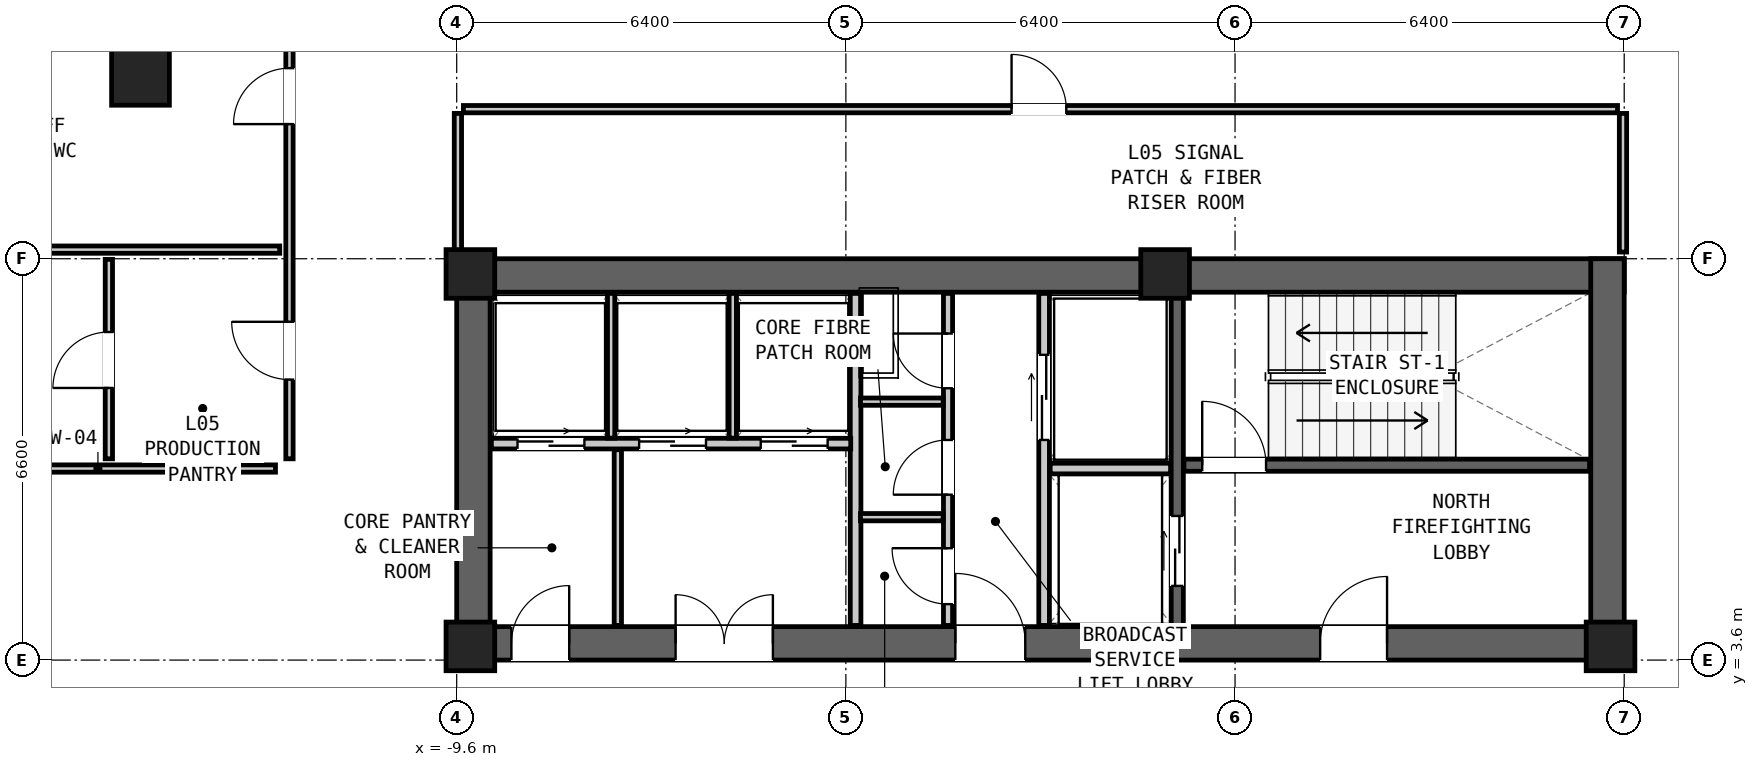
"""IFC4 building model, lengths in metres.
Left out: names, types, materials, properties, quantities, classifications, styles, units other than length and angle.
Written with IfcOpenShell. Run it as: python <this file> out.ifc"""

import sys

from ifc_helpers import new_model, si_unit, direction, frame, frame_2d, origin, origin_2d, place, context, subcontext, project, spatial, rectangle, hollow_rectangle, extrude, element, fill, save


model = new_model("IFC4")
c1 = context("Model", 3, precision=1e-05, world=origin(), true_north=direction((0.0, 1.0)))
c2 = subcontext(c1, "Body", "Model", "MODEL_VIEW")
j1 = project(units=[si_unit("LENGTHUNIT", "METRE"), si_unit("PLANEANGLEUNIT", "RADIAN")], contexts=[c1])
p1 = place(None, origin())
s1 = spatial("IfcSite", under=j1, at=p1, CompositionType="ELEMENT")
p2 = place(p1, origin())
s2 = spatial("IfcBuilding", under=s1, at=p2, CompositionType="ELEMENT")
p3 = place(p2, frame((0.0, 0.0, 21.9)))
s3 = spatial("IfcBuildingStorey", under=s2, at=p3, CompositionType="ELEMENT", Elevation=21.9)
p4 = place(p3, frame((-9.6, 9.925, 0.0), z_axis=(0.0, 0.0, 1.0), x_axis=(1.0, 0.0, 0.0)))
e1 = element("IfcWall", 1, at=p4, inside=s3, PredefinedType="SHEAR", context=c2, shape_type="SweptSolid", body=[
    extrude(rectangle(XDim=19.2, YDim=0.55, at=frame_2d((9.6, 0.0))), origin(), (0.0, 0.0, 1.0), 4.2),
])
p5 = place(p3, frame((-9.6, 3.875, 0.0), z_axis=(0.0, 0.0, 1.0), x_axis=(1.0, 0.0, 0.0)))
e2 = element("IfcWall", 2, at=p5, inside=s3, PredefinedType="SHEAR", context=c2, shape_type="SweptSolid", body=[
    extrude(rectangle(XDim=19.2, YDim=0.55, at=frame_2d((9.6, 0.0))), origin(), (0.0, 0.0, 1.0), 4.2),
])
p6 = place(p5, frame((14.2, 0.0, 0.0)))
e3 = element("IfcOpeningElement", 3, at=p6, cuts=e2, PredefinedType="OPENING", context=c2, shape_type="SweptSolid", body=[
    extrude(rectangle(XDim=1.1, YDim=2.08, at=frame_2d((0.55, 1.04))), frame((0.0, 0.287, 0.0), z_axis=(0.0, -1.0, 0.0), x_axis=(1.0, 0.0, 0.0)), (0.0, 0.0, 1.0), 0.574),
])
p7 = place(p5, frame((8.2, 0.0, 0.0)))
e4 = element("IfcOpeningElement", 4, at=p7, cuts=e2, PredefinedType="OPENING", context=c2, shape_type="SweptSolid", body=[
    extrude(rectangle(XDim=1.15, YDim=2.1, at=frame_2d((0.575, 1.05))), frame((0.0, 0.287, 0.0), z_axis=(0.0, -1.0, 0.0), x_axis=(1.0, 0.0, 0.0)), (0.0, 0.0, 1.0), 0.574),
])
p8 = place(p5, frame((0.9, 0.0, 0.0)))
e5 = element("IfcOpeningElement", 5, at=p8, cuts=e2, PredefinedType="OPENING", context=c2, shape_type="SweptSolid", body=[
    extrude(rectangle(XDim=0.95, YDim=2.1, at=frame_2d((0.475, 1.05))), frame((0.0, 0.287, 0.0), z_axis=(0.0, -1.0, 0.0), x_axis=(1.0, 0.0, 0.0)), (0.0, 0.0, 1.0), 0.574),
])
p9 = place(p5, frame((3.6, 0.0, 0.0)))
e6 = element("IfcOpeningElement", 6, at=p9, cuts=e2, PredefinedType="OPENING", context=c2, shape_type="SweptSolid", body=[
    extrude(rectangle(XDim=1.6, YDim=2.12, at=frame_2d((0.8, 1.06))), frame((0.0, 0.287, 0.0), z_axis=(0.0, -1.0, 0.0), x_axis=(1.0, 0.0, 0.0)), (0.0, 0.0, 1.0), 0.574),
])
for number, where, z_axis, x_axis in (
    (7, (-9.325, 3.6, 0.0), (0.0, 0.0, 1.0), (0.0, 1.0, 0.0)),
    (8, (9.325, 3.6, 0.0), (0.0, 0.0, 1.0), (0.0, 1.0, 0.0)),
):
    element("IfcWall", number, at=place(p3, frame(where, z_axis=z_axis, x_axis=x_axis)), inside=s3, PredefinedType="SHEAR", context=c2, shape_type="SweptSolid", body=[
        extrude(rectangle(XDim=6.6, YDim=0.55, at=frame_2d((3.3, 0.0))), origin(), (0.0, 0.0, 1.0), 4.2),
    ])
p10 = place(p3, frame((-14.8, 13.2, 0.0), z_axis=(0.0, 0.0, 1.0), x_axis=(1.0, 0.0, 0.0)))
e9 = element("IfcColumn", 9, at=p10, inside=s3, PredefinedType="COLUMN", context=c2, shape_type="SweptSolid", body=[
    extrude(hollow_rectangle(XDim=0.95, YDim=0.95, WallThickness=0.06, at=origin_2d()), origin(), (0.0, 0.0, 1.0), 4.2),
])
for number, where, z_axis, x_axis in (
    (10, (-9.375, 9.95, 0.0), (0.0, 0.0, 1.0), (1.0, 0.0, 0.0)),
    (11, (2.05, 9.95, 0.0), (0.0, 0.0, 1.0), (1.0, 0.0, 0.0)),
    (12, (-9.375, 3.825, 0.0), (0.0, 0.0, 1.0), (1.0, 0.0, 0.0)),
    (13, (9.375, 3.825, 0.0), (0.0, 0.0, 1.0), (1.0, 0.0, 0.0)),
):
    element("IfcColumn", number, at=place(p3, frame(where, z_axis=z_axis, x_axis=x_axis)), inside=s3, PredefinedType="COLUMN", context=c2, shape_type="SweptSolid", body=[
        extrude(rectangle(XDim=0.8, YDim=0.8, at=origin_2d()), origin(), (0.0, 0.0, 1.0), 4.2),
    ])
p11 = place(p3, frame((2.36, 6.805, 0.0), z_axis=(0.0, 0.0, 1.0), x_axis=(1.0, 0.0, 0.0)))
e14 = element("IfcWall", 14, at=p11, inside=s3, PredefinedType="SHEAR", context=c2, shape_type="SweptSolid", body=[
    extrude(rectangle(XDim=6.67, YDim=0.2, at=frame_2d((3.335, 0.0))), origin(), (0.0, 0.0, 1.0), 3.98),
])
p12 = place(p11, frame((0.3, 0.0, 0.0)))
e15 = element("IfcOpeningElement", 15, at=p12, cuts=e14, PredefinedType="OPENING", context=c2, shape_type="SweptSolid", body=[
    extrude(rectangle(XDim=1.05, YDim=2.08, at=frame_2d((0.525, 1.04))), frame((0.0, 0.112, 0.0), z_axis=(0.0, -1.0, 0.0), x_axis=(1.0, 0.0, 0.0)), (0.0, 0.0, 1.0), 0.224),
])
p13 = place(p3, frame((2.25, 4.17, 0.0), z_axis=(0.0, 0.0, 1.0), x_axis=(0.0, 1.0, 0.0)))
e16 = element("IfcWall", 16, at=p13, inside=s3, PredefinedType="SHEAR", context=c2, shape_type="SweptSolid", body=[
    extrude(rectangle(XDim=5.46, YDim=0.2, at=frame_2d((2.73, 0.0))), origin(), (0.0, 0.0, 1.0), 3.98),
])
p14 = place(p13, frame((0.65, 0.0, 0.0)))
e17 = element("IfcOpeningElement", 17, at=p14, cuts=e16, PredefinedType="OPENING", context=c2, shape_type="SweptSolid", body=[
    extrude(rectangle(XDim=1.15, YDim=2.08, at=frame_2d((0.575, 1.04))), frame((0.0, 0.112, 0.0), z_axis=(0.0, -1.0, 0.0), x_axis=(1.0, 0.0, 0.0)), (0.0, 0.0, 1.0), 0.224),
])
p15 = place(p3, frame((0.06, 4.17, 0.0), z_axis=(0.0, 0.0, 1.0), x_axis=(0.0, 1.0, 0.0)))
e18 = element("IfcWall", 18, at=p15, inside=s3, PredefinedType="PARTITIONING", context=c2, shape_type="SweptSolid", body=[
    extrude(rectangle(XDim=5.46, YDim=0.175, at=frame_2d((2.73, 0.0))), origin(), (0.0, 0.0, 1.0), 3.98),
])
p16 = place(p15, frame((3.05, 0.0, 0.0)))
e19 = element("IfcOpeningElement", 19, at=p16, cuts=e18, PredefinedType="OPENING", context=c2, shape_type="SweptSolid", body=[
    extrude(rectangle(XDim=1.4, YDim=2.12, at=frame_2d((0.7, 1.06))), frame((0.0, 0.1, 0.0), z_axis=(0.0, -1.0, 0.0), x_axis=(1.0, 0.0, 0.0)), (0.0, 0.0, 1.0), 0.199),
])
p17 = place(p3, frame((0.16, 6.75, 0.0), z_axis=(0.0, 0.0, 1.0), x_axis=(1.0, 0.0, 0.0)))
e20 = element("IfcWall", 20, at=p17, inside=s3, PredefinedType="PARTITIONING", context=c2, shape_type="SweptSolid", body=[
    extrude(rectangle(XDim=1.98, YDim=0.175, at=frame_2d((0.99, 0.0))), origin(), (0.0, 0.0, 1.0), 3.98),
])
p18 = place(p3, frame((-3.04, 4.17, 0.0), z_axis=(0.0, 0.0, 1.0), x_axis=(0.0, 1.0, 0.0)))
e21 = element("IfcWall", 21, at=p18, inside=s3, PredefinedType="PARTITIONING", context=c2, shape_type="SweptSolid", body=[
    extrude(rectangle(XDim=5.46, YDim=0.175, at=frame_2d((2.73, 0.0))), origin(), (0.0, 0.0, 1.0), 3.98),
])
p19 = place(p3, frame((-1.52, 4.17, 0.0), z_axis=(0.0, 0.0, 1.0), x_axis=(0.0, 1.0, 0.0)))
e22 = element("IfcWall", 22, at=p19, inside=s3, PredefinedType="PARTITIONING", context=c2, shape_type="SweptSolid", body=[
    extrude(rectangle(XDim=5.46, YDim=0.15, at=frame_2d((2.73, 0.0))), origin(), (0.0, 0.0, 1.0), 3.98),
])
p20 = place(p19, frame((3.9, 0.0, 0.0)))
e23 = element("IfcOpeningElement", 23, at=p20, cuts=e22, PredefinedType="OPENING", context=c2, shape_type="SweptSolid", body=[
    extrude(rectangle(XDim=0.9, YDim=2.05, at=frame_2d((0.45, 1.025))), frame((0.0, 0.087, 0.0), z_axis=(0.0, -1.0, 0.0), x_axis=(1.0, 0.0, 0.0)), (0.0, 0.0, 1.0), 0.174),
])
p21 = place(p19, frame((2.15, 0.0, 0.0)))
e24 = element("IfcOpeningElement", 24, at=p21, cuts=e22, PredefinedType="OPENING", context=c2, shape_type="SweptSolid", body=[
    extrude(rectangle(XDim=0.9, YDim=2.05, at=frame_2d((0.45, 1.025))), frame((0.0, 0.087, 0.0), z_axis=(0.0, -1.0, 0.0), x_axis=(1.0, 0.0, 0.0)), (0.0, 0.0, 1.0), 0.174),
])
p22 = place(p19, frame((0.35, 0.0, 0.0)))
e25 = element("IfcOpeningElement", 25, at=p22, cuts=e22, PredefinedType="OPENING", context=c2, shape_type="SweptSolid", body=[
    extrude(rectangle(XDim=0.92, YDim=2.1, at=frame_2d((0.46, 1.05))), frame((0.0, 0.087, 0.0), z_axis=(0.0, -1.0, 0.0), x_axis=(1.0, 0.0, 0.0)), (0.0, 0.0, 1.0), 0.174),
])
for number, where, z_axis, x_axis in (
    (26, (-2.96, 5.95, 0.0), (0.0, 0.0, 1.0), (1.0, 0.0, 0.0)),
    (27, (-2.96, 7.85, 0.0), (0.0, 0.0, 1.0), (1.0, 0.0, 0.0)),
):
    element("IfcWall", number, at=place(p3, frame(where, z_axis=z_axis, x_axis=x_axis)), inside=s3, PredefinedType="PARTITIONING", context=c2, shape_type="SweptSolid", body=[
        extrude(rectangle(XDim=1.36, YDim=0.12, at=frame_2d((0.68, 0.0))), origin(), (0.0, 0.0, 1.0), 3.98),
    ])
p23 = place(p3, frame((-9.03, 7.16, 0.0), z_axis=(0.0, 0.0, 1.0), x_axis=(1.0, 0.0, 0.0)))
e28 = element("IfcWall", 28, at=p23, inside=s3, PredefinedType="PARTITIONING", context=c2, shape_type="SweptSolid", body=[
    extrude(rectangle(XDim=5.91, YDim=0.175, at=frame_2d((2.955, 0.0))), origin(), (0.0, 0.0, 1.0), 3.98),
])
p24 = place(p23, frame((0.43, 0.0, 0.0)))
e29 = element("IfcOpeningElement", 29, at=p24, cuts=e28, PredefinedType="OPENING", context=c2, shape_type="SweptSolid", body=[
    extrude(rectangle(XDim=1.1, YDim=2.06, at=frame_2d((0.55, 1.03))), frame((0.0, 0.1, 0.0), z_axis=(0.0, -1.0, 0.0), x_axis=(1.0, 0.0, 0.0)), (0.0, 0.0, 1.0), 0.199),
])
p25 = place(p23, frame((2.43, 0.0, 0.0)))
e30 = element("IfcOpeningElement", 30, at=p25, cuts=e28, PredefinedType="OPENING", context=c2, shape_type="SweptSolid", body=[
    extrude(rectangle(XDim=1.1, YDim=2.06, at=frame_2d((0.55, 1.03))), frame((0.0, 0.1, 0.0), z_axis=(0.0, -1.0, 0.0), x_axis=(1.0, 0.0, 0.0)), (0.0, 0.0, 1.0), 0.199),
])
p26 = place(p23, frame((4.43, 0.0, 0.0)))
e31 = element("IfcOpeningElement", 31, at=p26, cuts=e28, PredefinedType="OPENING", context=c2, shape_type="SweptSolid", body=[
    extrude(rectangle(XDim=1.1, YDim=2.06, at=frame_2d((0.55, 1.03))), frame((0.0, 0.1, 0.0), z_axis=(0.0, -1.0, 0.0), x_axis=(1.0, 0.0, 0.0)), (0.0, 0.0, 1.0), 0.199),
])
for number, where, z_axis, x_axis in (
    (32, (-7.06, 7.25, 0.0), (0.0, 0.0, 1.0), (0.0, 1.0, 0.0)),
    (33, (-5.06, 7.25, 0.0), (0.0, 0.0, 1.0), (0.0, 1.0, 0.0)),
):
    element("IfcWall", number, at=place(p3, frame(where, z_axis=z_axis, x_axis=x_axis)), inside=s3, PredefinedType="PARTITIONING", context=c2, shape_type="SweptSolid", body=[
        extrude(rectangle(XDim=2.38, YDim=0.12, at=frame_2d((1.19, 0.0))), origin(), (0.0, 0.0, 1.0), 3.98),
    ])
p27 = place(p3, frame((-6.95, 4.17, 0.0), z_axis=(0.0, 0.0, 1.0), x_axis=(0.0, 1.0, 0.0)))
e34 = element("IfcWall", 34, at=p27, inside=s3, PredefinedType="PARTITIONING", context=c2, shape_type="SweptSolid", body=[
    extrude(rectangle(XDim=2.89, YDim=0.12, at=frame_2d((1.445, 0.0))), origin(), (0.0, 0.0, 1.0), 3.98),
])
p28 = place(p3, frame((-18.42, 6.75, 0.0), z_axis=(0.0, 0.0, 1.0), x_axis=(1.0, 0.0, 0.0)))
e35 = element("IfcWall", 35, at=p28, inside=s3, PredefinedType="PARTITIONING", context=c2, shape_type="SweptSolid", body=[
    extrude(rectangle(XDim=5.84, YDim=0.12, at=frame_2d((2.92, 0.0))), origin(), (0.0, 0.0, 1.0), 3.424),
])
p29 = place(p3, frame((-18.49, 10.35, 0.0), z_axis=(0.0, 0.0, 1.0), x_axis=(1.0, 0.0, 0.0)))
e36 = element("IfcWall", 36, at=p29, inside=s3, PredefinedType="PARTITIONING", context=c2, shape_type="SweptSolid", body=[
    extrude(rectangle(XDim=5.98, YDim=0.12, at=frame_2d((2.99, 0.0))), origin(), (0.0, 0.0, 1.0), 2.949),
])
p30 = place(p3, frame((-15.32, 6.91, 0.0), z_axis=(0.0, 0.0, 1.0), x_axis=(0.0, 1.0, 0.0)))
e37 = element("IfcWall", 37, at=p30, inside=s3, PredefinedType="PARTITIONING", context=c2, shape_type="SweptSolid", body=[
    extrude(rectangle(XDim=3.28, YDim=0.12, at=frame_2d((1.64, 0.0))), origin(), (0.0, 0.0, 1.0), 3.98),
])
p31 = place(p30, frame((1.165, 0.0, 0.0)))
e38 = element("IfcOpeningElement", 38, at=p31, cuts=e37, PredefinedType="OPENING", context=c2, shape_type="SweptSolid", body=[
    extrude(rectangle(XDim=0.92, YDim=2.1, at=frame_2d((0.46, 1.05))), frame((0.0, 0.072, 0.0), z_axis=(0.0, -1.0, 0.0), x_axis=(1.0, 0.0, 0.0)), (0.0, 0.0, 1.0), 0.144),
])
p32 = place(p3, frame((-12.35, 6.91, 0.0), z_axis=(0.0, 0.0, 1.0), x_axis=(0.0, 1.0, 0.0)))
e39 = element("IfcWall", 39, at=p32, inside=s3, PredefinedType="PARTITIONING", context=c2, shape_type="SweptSolid", body=[
    extrude(rectangle(XDim=8.08, YDim=0.12, at=frame_2d((4.04, 0.0))), origin(), (0.0, 0.0, 1.0), 3.98),
])
p33 = place(p32, frame((1.303, 0.0, 0.0)))
e40 = element("IfcOpeningElement", 40, at=p33, cuts=e39, PredefinedType="OPENING", context=c2, shape_type="SweptSolid", body=[
    extrude(rectangle(XDim=0.95, YDim=2.1, at=frame_2d((0.475, 1.05))), frame((0.0, 0.072, 0.0), z_axis=(0.0, -1.0, 0.0), x_axis=(1.0, 0.0, 0.0)), (0.0, 0.0, 1.0), 0.144),
])
p34 = place(p32, frame((5.504, 0.0, 0.0)))
e41 = element("IfcOpeningElement", 41, at=p34, cuts=e39, PredefinedType="OPENING", context=c2, shape_type="SweptSolid", body=[
    extrude(rectangle(XDim=0.92, YDim=2.1, at=frame_2d((0.46, 1.05))), frame((0.0, 0.072, 0.0), z_axis=(0.0, -1.0, 0.0), x_axis=(1.0, 0.0, 0.0)), (0.0, 0.0, 1.0), 0.144),
])
p35 = place(p3, frame((-9.49, 12.66, 0.0), z_axis=(0.0, 0.0, 1.0), x_axis=(1.0, 0.0, 0.0)))
e42 = element("IfcWall", 42, at=p35, inside=s3, PredefinedType="PARTITIONING", context=c2, shape_type="SweptSolid", body=[
    extrude(rectangle(XDim=18.98, YDim=0.12, at=frame_2d((9.49, 0.0))), origin(), (0.0, 0.0, 1.0), 3.98),
])
p36 = place(p35, frame((9.015, 0.0, 0.0)))
e43 = element("IfcOpeningElement", 43, at=p36, cuts=e42, PredefinedType="OPENING", context=c2, shape_type="SweptSolid", body=[
    extrude(rectangle(XDim=0.9, YDim=2.05, at=frame_2d((0.45, 1.025))), frame((0.0, 0.072, 0.0), z_axis=(0.0, -1.0, 0.0), x_axis=(1.0, 0.0, 0.0)), (0.0, 0.0, 1.0), 0.144),
])
for number, where, z_axis, x_axis in (
    (44, (-9.58, 10.31, 0.0), (0.0, 0.0, 1.0), (0.0, 1.0, 0.0)),
    (45, (9.58, 10.31, 0.0), (0.0, 0.0, 1.0), (0.0, 1.0, 0.0)),
):
    element("IfcWall", number, at=place(p3, frame(where, z_axis=z_axis, x_axis=x_axis)), inside=s3, PredefinedType="PARTITIONING", context=c2, shape_type="SweptSolid", body=[
        extrude(rectangle(XDim=2.28, YDim=0.12, at=frame_2d((1.14, 0.0))), origin(), (0.0, 0.0, 1.0), 2.949),
    ])
p37 = place(p12, origin())
e46 = element("IfcDoor", 46, at=p37, inside=s3, OperationType="SINGLE_SWING_LEFT", PredefinedType="DOOR", context=c2, shape_type="SweptSolid", body=[
    extrude(rectangle(XDim=1.05, YDim=2.08, at=frame_2d((0.525, 1.04))), frame((0.0, 0.025, 0.0), z_axis=(0.0, -1.0, 0.0), x_axis=(1.0, 0.0, 0.0)), (0.0, 0.0, 1.0), 0.05),
])
fill(e15, e46)
p38 = place(p6, origin())
e47 = element("IfcDoor", 47, at=p38, inside=s3, OperationType="SINGLE_SWING_RIGHT", PredefinedType="DOOR", context=c2, shape_type="SweptSolid", body=[
    extrude(rectangle(XDim=1.1, YDim=2.08, at=frame_2d((0.55, 1.04))), frame((0.0, 0.025, 0.0), z_axis=(0.0, -1.0, 0.0), x_axis=(1.0, 0.0, 0.0)), (0.0, 0.0, 1.0), 0.05),
])
fill(e3, e47)
p39 = place(p14, origin())
e48 = element("IfcDoor", 48, at=p39, inside=s3, OperationType="DOUBLE_DOOR_SLIDING", PredefinedType="DOOR", context=c2, shape_type="SweptSolid", body=[
    extrude(rectangle(XDim=1.15, YDim=2.08, at=frame_2d((0.575, 1.04))), frame((0.0, 0.025, 0.0), z_axis=(0.0, -1.0, 0.0), x_axis=(1.0, 0.0, 0.0)), (0.0, 0.0, 1.0), 0.05),
])
fill(e17, e48)
p40 = place(p16, origin())
e49 = element("IfcDoor", 49, at=p40, inside=s3, OperationType="DOUBLE_DOOR_SLIDING", PredefinedType="DOOR", context=c2, shape_type="SweptSolid", body=[
    extrude(rectangle(XDim=1.4, YDim=2.12, at=frame_2d((0.7, 1.06))), frame((0.0, 0.025, 0.0), z_axis=(0.0, -1.0, 0.0), x_axis=(1.0, 0.0, 0.0)), (0.0, 0.0, 1.0), 0.05),
])
fill(e19, e49)
p41 = place(p7, origin())
e50 = element("IfcDoor", 50, at=p41, inside=s3, OperationType="SINGLE_SWING_LEFT", PredefinedType="DOOR", context=c2, shape_type="SweptSolid", body=[
    extrude(rectangle(XDim=1.15, YDim=2.1, at=frame_2d((0.575, 1.05))), frame((0.0, 0.025, 0.0), z_axis=(0.0, -1.0, 0.0), x_axis=(1.0, 0.0, 0.0)), (0.0, 0.0, 1.0), 0.05),
])
fill(e4, e50)
p42 = place(p20, origin())
e51 = element("IfcDoor", 51, at=p42, inside=s3, OperationType="SINGLE_SWING_RIGHT", PredefinedType="DOOR", context=c2, shape_type="SweptSolid", body=[
    extrude(rectangle(XDim=0.9, YDim=2.05, at=frame_2d((0.45, 1.025))), frame((0.0, 0.025, 0.0), z_axis=(0.0, -1.0, 0.0), x_axis=(1.0, 0.0, 0.0)), (0.0, 0.0, 1.0), 0.05),
])
fill(e23, e51)
p43 = place(p21, origin())
e52 = element("IfcDoor", 52, at=p43, inside=s3, OperationType="SINGLE_SWING_LEFT", PredefinedType="DOOR", context=c2, shape_type="SweptSolid", body=[
    extrude(rectangle(XDim=0.9, YDim=2.05, at=frame_2d((0.45, 1.025))), frame((0.0, 0.025, 0.0), z_axis=(0.0, -1.0, 0.0), x_axis=(1.0, 0.0, 0.0)), (0.0, 0.0, 1.0), 0.05),
])
fill(e24, e52)
p44 = place(p22, origin())
e53 = element("IfcDoor", 53, at=p44, inside=s3, OperationType="SINGLE_SWING_RIGHT", PredefinedType="DOOR", context=c2, shape_type="SweptSolid", body=[
    extrude(rectangle(XDim=0.92, YDim=2.1, at=frame_2d((0.46, 1.05))), frame((0.0, 0.025, 0.0), z_axis=(0.0, -1.0, 0.0), x_axis=(1.0, 0.0, 0.0)), (0.0, 0.0, 1.0), 0.05),
])
fill(e25, e53)
p45 = place(p24, origin())
e54 = element("IfcDoor", 54, at=p45, inside=s3, OperationType="DOUBLE_DOOR_SLIDING", PredefinedType="DOOR", context=c2, shape_type="SweptSolid", body=[
    extrude(rectangle(XDim=1.1, YDim=2.06, at=frame_2d((0.55, 1.03))), frame((0.0, 0.025, 0.0), z_axis=(0.0, -1.0, 0.0), x_axis=(1.0, 0.0, 0.0)), (0.0, 0.0, 1.0), 0.05),
])
fill(e29, e54)
p46 = place(p25, origin())
e55 = element("IfcDoor", 55, at=p46, inside=s3, OperationType="DOUBLE_DOOR_SLIDING", PredefinedType="DOOR", context=c2, shape_type="SweptSolid", body=[
    extrude(rectangle(XDim=1.1, YDim=2.06, at=frame_2d((0.55, 1.03))), frame((0.0, 0.025, 0.0), z_axis=(0.0, -1.0, 0.0), x_axis=(1.0, 0.0, 0.0)), (0.0, 0.0, 1.0), 0.05),
])
fill(e30, e55)
p47 = place(p26, origin())
e56 = element("IfcDoor", 56, at=p47, inside=s3, OperationType="DOUBLE_DOOR_SLIDING", PredefinedType="DOOR", context=c2, shape_type="SweptSolid", body=[
    extrude(rectangle(XDim=1.1, YDim=2.06, at=frame_2d((0.55, 1.03))), frame((0.0, 0.025, 0.0), z_axis=(0.0, -1.0, 0.0), x_axis=(1.0, 0.0, 0.0)), (0.0, 0.0, 1.0), 0.05),
])
fill(e31, e56)
p48 = place(p8, origin())
e57 = element("IfcDoor", 57, at=p48, inside=s3, OperationType="SINGLE_SWING_RIGHT", PredefinedType="DOOR", context=c2, shape_type="SweptSolid", body=[
    extrude(rectangle(XDim=0.95, YDim=2.1, at=frame_2d((0.475, 1.05))), frame((0.0, 0.025, 0.0), z_axis=(0.0, -1.0, 0.0), x_axis=(1.0, 0.0, 0.0)), (0.0, 0.0, 1.0), 0.05),
])
fill(e5, e57)
p49 = place(p9, origin())
e58 = element("IfcDoor", 58, at=p49, inside=s3, OperationType="DOUBLE_DOOR_SINGLE_SWING", PredefinedType="DOOR", context=c2, shape_type="SweptSolid", body=[
    extrude(rectangle(XDim=1.6, YDim=2.12, at=frame_2d((0.8, 1.06))), frame((0.0, 0.025, 0.0), z_axis=(0.0, -1.0, 0.0), x_axis=(1.0, 0.0, 0.0)), (0.0, 0.0, 1.0), 0.05),
])
fill(e6, e58)
p50 = place(p31, origin())
e59 = element("IfcDoor", 59, at=p50, inside=s3, OperationType="SINGLE_SWING_LEFT", PredefinedType="DOOR", context=c2, shape_type="SweptSolid", body=[
    extrude(rectangle(XDim=0.92, YDim=2.1, at=frame_2d((0.46, 1.05))), frame((0.0, 0.025, 0.0), z_axis=(0.0, -1.0, 0.0), x_axis=(1.0, 0.0, 0.0)), (0.0, 0.0, 1.0), 0.05),
])
fill(e38, e59)
p51 = place(p33, origin())
e60 = element("IfcDoor", 60, at=p51, inside=s3, OperationType="SINGLE_SWING_RIGHT", PredefinedType="DOOR", context=c2, shape_type="SweptSolid", body=[
    extrude(rectangle(XDim=0.95, YDim=2.1, at=frame_2d((0.475, 1.05))), frame((0.0, 0.025, 0.0), z_axis=(0.0, -1.0, 0.0), x_axis=(1.0, 0.0, 0.0)), (0.0, 0.0, 1.0), 0.05),
])
fill(e40, e60)
p52 = place(p34, origin())
e61 = element("IfcDoor", 61, at=p52, inside=s3, OperationType="SINGLE_SWING_LEFT", PredefinedType="DOOR", context=c2, shape_type="SweptSolid", body=[
    extrude(rectangle(XDim=0.92, YDim=2.1, at=frame_2d((0.46, 1.05))), frame((0.0, 0.025, 0.0), z_axis=(0.0, -1.0, 0.0), x_axis=(1.0, 0.0, 0.0)), (0.0, 0.0, 1.0), 0.05),
])
fill(e41, e61)
p53 = place(p36, origin())
e62 = element("IfcDoor", 62, at=p53, inside=s3, OperationType="SINGLE_SWING_LEFT", PredefinedType="DOOR", context=c2, shape_type="SweptSolid", body=[
    extrude(rectangle(XDim=0.9, YDim=2.05, at=frame_2d((0.45, 1.025))), frame((0.0, 0.025, 0.0), z_axis=(0.0, -1.0, 0.0), x_axis=(1.0, 0.0, 0.0)), (0.0, 0.0, 1.0), 0.05),
])
fill(e43, e62)
save(model, sys.argv[1])
